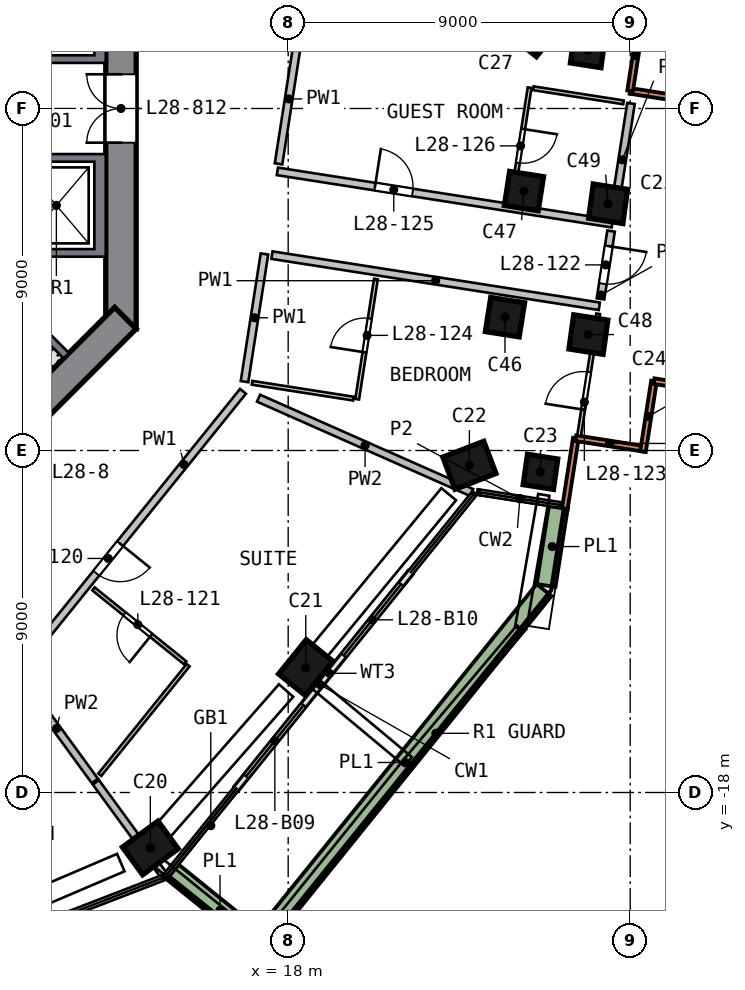
"""IFC4 building model, lengths in metres.
Left out: names, types, materials, properties, quantities, classifications, styles, units other than length and angle.
Written with IfcOpenShell. Run it as: python <this file> out.ifc"""

import sys

from ifc_helpers import new_model, si_unit, direction, frame, frame_2d, origin, origin_2d, place, context, subcontext, project, spatial, polyline, rectangle, outline, extrude, element, fill, save


model = new_model("IFC4")
c1 = context("Model", 3, precision=1e-05, world=origin(), true_north=direction((0.0, 1.0)))
c2 = subcontext(c1, "Body", "Model", "MODEL_VIEW")
j1 = project(units=[si_unit("LENGTHUNIT", "METRE"), si_unit("PLANEANGLEUNIT", "RADIAN")], contexts=[c1])
p1 = place(None, origin())
s1 = spatial("IfcSite", under=j1, at=p1, CompositionType="ELEMENT")
p2 = place(p1, origin())
s2 = spatial("IfcBuilding", under=s1, at=p2, CompositionType="ELEMENT")
p3 = place(p2, frame((0.0, 0.0, 118.5)))
s3 = spatial("IfcBuildingStorey", under=s2, at=p3, CompositionType="ELEMENT", Elevation=118.5)
p4 = place(p3, frame((14.261, -19.542, 0.0), z_axis=(0.092399372, 0.068632604, 0.993353875), x_axis=(-0.80243765, -0.585531111, 0.115096203)))
e1 = element("IfcColumn", 1, at=p4, inside=s3, PredefinedType="COLUMN", context=c2, shape_type="SweptSolid", body=[
    extrude(rectangle(XDim=1.15, YDim=0.9, at=origin_2d()), origin(), (0.0, 0.0, 1.0), 3.02),
])
p5 = place(p3, frame((18.378, -14.819, 0.0), z_axis=(0.069786874, 0.087981597, 0.99367451), x_axis=(0.624093395, 0.773238231, -0.11229458)))
e2 = element("IfcColumn", 2, at=p5, inside=s3, PredefinedType="COLUMN", context=c2, shape_type="SweptSolid", body=[
    extrude(rectangle(XDim=1.15, YDim=0.9, at=origin_2d()), origin(), (0.0, 0.0, 1.0), 3.019),
])
p6 = place(p3, frame((22.715, -9.521, 0.0), z_axis=(0.044289639, 0.108380303, 0.993122418), x_axis=(-0.93207803, -0.353286088, 0.080121696)))
e3 = element("IfcColumn", 3, at=p6, inside=s3, PredefinedType="COLUMN", context=c2, shape_type="SweptSolid", body=[
    extrude(rectangle(XDim=1.15, YDim=0.9, at=origin_2d()), origin(), (0.0, 0.0, 1.0), 3.021),
])
p7 = place(p3, frame((24.762, -9.729, 0.0), z_axis=(-0.10111444, 0.137518846, 0.985324534), x_axis=(0.982955724, -0.139038155, 0.120276498)))
e4 = element("IfcColumn", 4, at=p7, inside=s3, PredefinedType="COLUMN", context=c2, shape_type="SweptSolid", body=[
    extrude(rectangle(XDim=0.8, YDim=0.8, at=origin_2d()), origin(), (0.0, 0.0, 1.0), 3.045),
])
p8 = place(p3, frame((26.07, 1.362, 0.0), z_axis=(-0.15242064, 0.14215314, 0.978039075), x_axis=(-0.976379461, 0.131678342, -0.171300796)))
e5 = element("IfcColumn", 5, at=p8, inside=s3, PredefinedType="COLUMN", context=c2, shape_type="SweptSolid", body=[
    extrude(rectangle(XDim=0.8, YDim=0.8, at=origin_2d()), origin(), (0.0, 0.0, 1.0), 3.067),
])
p9 = place(p3, frame((24.377, 1.94, 0.0), z_axis=(-0.01026508, 0.115906491, 0.993207085), x_axis=(0.780504995, -0.619955936, 0.080415116)))
e6 = element("IfcColumn", 6, at=p9, inside=s3, PredefinedType="COLUMN", context=c2, shape_type="SweptSolid", body=[
    extrude(rectangle(XDim=1.15, YDim=0.9, at=origin_2d()), origin(), (0.0, 0.0, 1.0), 3.021),
])
for number, where, z_axis, x_axis in (
    (7, (23.673, -5.628, 0.0), (0.026, 0.113, 0.993), (0.988, -0.155, -0.008)),
    (8, (24.191, -2.312, 0.0), (0.01, 0.115, 0.993), (0.988, -0.153, 0.008)),
):
    element("IfcColumn", number, at=place(p3, frame(where, z_axis=z_axis, x_axis=x_axis)), inside=s3, PredefinedType="COLUMN", context=c2, shape_type="SweptSolid", body=[
        extrude(rectangle(XDim=0.9, YDim=0.9, at=origin_2d()), origin(), (0.0, 0.0, 1.0), 3.02),
    ])
p10 = place(p3, frame((26.044, -6.124, 0.0), z_axis=(-0.117876794, 0.14298759, 0.982679811), x_axis=(0.981143386, -0.135873277, 0.137463116)))
e9 = element("IfcColumn", 9, at=p10, inside=s3, PredefinedType="COLUMN", context=c2, shape_type="SweptSolid", body=[
    extrude(rectangle(XDim=0.9, YDim=0.9, at=origin_2d()), origin(), (0.0, 0.0, 1.0), 3.053),
])
p11 = place(p3, frame((26.581, -2.685, 0.0), z_axis=(-0.133791288, 0.145040287, 0.980338312), x_axis=(0.979119115, -0.13343364, 0.153366301)))
e10 = element("IfcColumn", 10, at=p11, inside=s3, PredefinedType="COLUMN", context=c2, shape_type="SweptSolid", body=[
    extrude(rectangle(XDim=0.9, YDim=0.9, at=origin_2d()), origin(), (0.0, 0.0, 1.0), 3.06),
])
p12 = place(p3, frame((13.6, -5.799, 0.0), z_axis=(0.0, 0.0, 1.0), x_axis=(0.0, 1.0, 0.0)))
e11 = element("IfcWall", 11, at=p12, inside=s3, PredefinedType="SHEAR", context=c2, shape_type="SweptSolid", body=[
    extrude(rectangle(XDim=11.598, YDim=0.8, at=frame_2d((5.799, 0.0))), origin(), (0.0, 0.0, 1.0), 3.5),
])
p13 = place(p12, frame((4.899, 0.0, 0.0)))
e12 = element("IfcOpeningElement", 12, at=p13, cuts=e11, PredefinedType="OPENING", context=c2, shape_type="SweptSolid", body=[
    extrude(rectangle(XDim=1.8, YDim=2.1, at=frame_2d((0.9, 1.05))), frame((0.0, 0.41, 0.0), z_axis=(0.0, -1.0, 0.0), x_axis=(1.0, 0.0, 0.0)), (0.0, 0.0, 1.0), 0.82),
])
p14 = place(p3, frame((5.516, -13.717, 0.0), z_axis=(0.0, 0.0, 1.0), x_axis=(0.707106781, 0.707106781, 0.0)))
e13 = element("IfcWall", 13, at=p14, inside=s3, PredefinedType="SHEAR", context=c2, shape_type="SweptSolid", body=[
    extrude(rectangle(XDim=11.598, YDim=0.8, at=frame_2d((5.799, 0.0))), origin(), (0.0, 0.0, 1.0), 3.5),
])
p15 = place(p14, frame((2.099, 0.0, 0.0)))
e14 = element("IfcOpeningElement", 14, at=p15, cuts=e13, PredefinedType="OPENING", context=c2, shape_type="SweptSolid", body=[
    extrude(rectangle(XDim=1.2, YDim=2.1, at=frame_2d((0.6, 1.05))), frame((0.0, 0.41, 0.0), z_axis=(0.0, -1.0, 0.0), x_axis=(1.0, 0.0, 0.0)), (0.0, 0.0, 1.0), 0.82),
])
p16 = place(p3, frame((25.28, -10.529, 0.0), z_axis=(0.0, 0.0, 1.0), x_axis=(0.154424544, 0.988004585, 0.0)))
e15 = element("IfcWall", 15, at=p16, inside=s3, PredefinedType="SOLIDWALL", context=c2, shape_type="SweptSolid", body=[
    extrude(rectangle(XDim=1.875, YDim=0.15, at=frame_2d((0.938, 0.0))), origin(), (0.0, 0.0, 1.0), 3.0),
])
p17 = place(p3, frame((25.569, -8.676, 0.0), z_axis=(0.0, 0.0, 1.0), x_axis=(0.98801462, -0.154360329, 0.0)))
e16 = element("IfcWall", 16, at=p17, inside=s3, PredefinedType="SOLIDWALL", context=c2, shape_type="SweptSolid", body=[
    extrude(rectangle(XDim=1.8, YDim=0.15, at=frame_2d((0.9, 0.0))), origin(), (0.0, 0.0, 1.0), 3.0),
])
for number, where, z_axis, x_axis in (
    (17, (27.336, -9.028, 0.0), (0.0, 0.0, 1.0), (0.154, 0.988, 0.0)),
    (18, (27.625, -7.175, 0.0), (0.0, 0.0, 1.0), (0.988, -0.154, 0.0)),
):
    element("IfcWall", number, at=place(p3, frame(where, z_axis=z_axis, x_axis=x_axis)), inside=s3, PredefinedType="SOLIDWALL", context=c2, shape_type="SweptSolid", body=[
        extrude(rectangle(XDim=1.875, YDim=0.15, at=frame_2d((0.938, 0.0))), origin(), (0.0, 0.0, 1.0), 3.0),
    ])
p18 = place(p3, frame((28.849, 0.174, 0.0), z_axis=(0.0, 0.0, 1.0), x_axis=(-0.988021343, 0.154317292, 0.0)))
e19 = element("IfcWall", 19, at=p18, inside=s3, PredefinedType="SOLIDWALL", context=c2, shape_type="SweptSolid", body=[
    extrude(rectangle(XDim=1.875, YDim=0.15, at=frame_2d((0.938, 0.0))), origin(), (0.0, 0.0, 1.0), 3.0),
])
p19 = place(p3, frame((26.997, 0.463, 0.0), z_axis=(0.0, 0.0, 1.0), x_axis=(0.154297439, 0.988024443, 0.0)))
e20 = element("IfcWall", 20, at=p19, inside=s3, PredefinedType="SOLIDWALL", context=c2, shape_type="SweptSolid", body=[
    extrude(rectangle(XDim=1.875, YDim=0.15, at=frame_2d((0.938, 0.0))), origin(), (0.0, 0.0, 1.0), 3.0),
])
p20 = place(p3, frame((16.645, -17.885, 0.0), z_axis=(0.0, 0.0, 1.0), x_axis=(0.627731853, 0.778429651, 0.0)))
e21 = element("IfcWall", 21, at=p20, inside=s3, PredefinedType="SOLIDWALL", context=c2, shape_type="SweptSolid", body=[
    extrude(rectangle(XDim=3.475, YDim=0.15, at=frame_2d((1.738, 0.0))), origin(), (0.0, 0.0, 1.0), 2.935),
])
p21 = place(p20, frame((0.4, 0.0, 0.0)))
e22 = element("IfcOpeningElement", 22, at=p21, cuts=e21, PredefinedType="OPENING", context=c2, shape_type="SweptSolid", body=[
    extrude(rectangle(XDim=2.4, YDim=2.4, at=frame_2d((1.2, 1.2))), frame((0.0, 0.085, 0.0), z_axis=(0.0, -1.0, 0.0), x_axis=(1.0, 0.0, 0.0)), (0.0, 0.0, 1.0), 0.17),
])
p22 = place(p3, frame((18.826, -15.18, 0.0), z_axis=(0.0, 0.0, 1.0), x_axis=(0.627703654, 0.77845239, 0.0)))
e23 = element("IfcWall", 23, at=p22, inside=s3, PredefinedType="SOLIDWALL", context=c2, shape_type="SweptSolid", body=[
    extrude(rectangle(XDim=3.814, YDim=0.15, at=frame_2d((1.907, 0.0))), origin(), (0.0, 0.0, 1.0), 2.935),
])
p23 = place(p22, frame((1.014, 0.0, 0.0)))
e24 = element("IfcOpeningElement", 24, at=p23, cuts=e23, PredefinedType="OPENING", context=c2, shape_type="SweptSolid", body=[
    extrude(rectangle(XDim=2.4, YDim=2.4, at=frame_2d((1.2, 1.2))), frame((0.0, 0.085, 0.0), z_axis=(0.0, -1.0, 0.0), x_axis=(1.0, 0.0, 0.0)), (0.0, 0.0, 1.0), 0.17),
])
p24 = place(p3, frame((14.962, -20.093, 0.0), z_axis=(0.0, 0.0, 1.0), x_axis=(0.778443113, -0.627715158, 0.0)))
e25 = element("IfcWall", 25, at=p24, inside=s3, PredefinedType="SOLIDWALL", context=c2, shape_type="SweptSolid", body=[
    extrude(rectangle(XDim=3.199, YDim=0.5, at=frame_2d((1.6, 0.0))), origin(), (0.0, 0.0, 1.0), 0.7),
])
p25 = place(p3, frame((17.415, -21.749, 0.0), z_axis=(0.0, 0.0, 1.0), x_axis=(0.627680422, 0.778471122, 0.0)))
e26 = element("IfcWall", 26, at=p25, inside=s3, PredefinedType="SOLIDWALL", context=c2, shape_type="SweptSolid", body=[
    extrude(rectangle(XDim=11.661, YDim=0.5, at=frame_2d((5.83, 0.0))), origin(), (0.0, 0.0, 1.0), 0.7),
])
p26 = place(p3, frame((24.786, -12.553, 0.0), z_axis=(0.0, 0.0, 1.0), x_axis=(0.154416344, 0.988005867, 0.0)))
e27 = element("IfcWall", 27, at=p26, inside=s3, PredefinedType="SOLIDWALL", context=c2, shape_type="SweptSolid", body=[
    extrude(rectangle(XDim=2.076, YDim=0.5, at=frame_2d((1.038, 0.0))), origin(), (0.0, 0.0, 1.0), 0.7),
])
p27 = place(p3, origin())
e28 = element("IfcWall", 28, at=p27, inside=s3, PredefinedType="SOLIDWALL", context=c2, shape_type="SweptSolid", body=[
    extrude(outline(polyline([(13.2, -3.9), (10.9, -3.9), (10.9, -3.7), (12.9, -3.7), (12.9, -1.4), (10.9, -1.4), (10.9, -1.2), (13.2, -1.2), (13.2, -3.9)])), origin(), (0.0, 0.0, 1.0), 3.0),
])
p28 = place(p3, origin())
e29 = element("IfcWall", 29, at=p28, inside=s3, PredefinedType="SOLIDWALL", context=c2, shape_type="SweptSolid", body=[
    extrude(outline(polyline([(13.2, 3.9), (13.2, 1.2), (10.9, 1.2), (10.9, 1.4), (12.9, 1.4), (12.9, 3.7), (10.9, 3.7), (10.9, 3.9), (13.2, 3.9)])), origin(), (0.0, 0.0, 1.0), 3.0),
])
p29 = place(p3, frame((9.334, -3.677, 0.0), z_axis=(0.0, 0.0, 1.0), x_axis=(0.707106781, -0.707106781, 0.0)))
e30 = element("IfcWall", 30, at=p29, inside=s3, PredefinedType="SOLIDWALL", context=c2, shape_type="SweptSolid", body=[
    extrude(rectangle(XDim=4.0, YDim=0.2, at=frame_2d((2.0, 0.0))), origin(), (0.0, 0.0, 1.0), 3.0),
])
p30 = place(p3, frame((16.811, -7.443, 0.0), z_axis=(0.0, 0.0, 1.0), x_axis=(-0.627684838, -0.778467561, 0.0)))
e31 = element("IfcWall", 31, at=p30, inside=s3, PredefinedType="SOLIDWALL", context=c2, shape_type="SweptSolid", body=[
    extrude(rectangle(XDim=9.317, YDim=0.2, at=frame_2d((4.658, 0.0))), origin(), (0.0, 0.0, 1.0), 3.0),
])
p31 = place(p30, frame((5.15, 0.0, 0.0)))
e32 = element("IfcOpeningElement", 32, at=p31, cuts=e31, PredefinedType="OPENING", context=c2, shape_type="SweptSolid", body=[
    extrude(rectangle(XDim=1.0, YDim=2.1, at=frame_2d((0.5, 1.05))), frame((0.0, 0.11, 0.0), z_axis=(0.0, -1.0, 0.0), x_axis=(1.0, 0.0, 0.0)), (0.0, 0.0, 1.0), 0.22),
])
p32 = place(p3, frame((16.851, -7.187, 0.0), z_axis=(0.0, 0.0, 1.0), x_axis=(0.154387833, 0.988010322, 0.0)))
e33 = element("IfcWall", 33, at=p32, inside=s3, PredefinedType="SOLIDWALL", context=c2, shape_type="SweptSolid", body=[
    extrude(rectangle(XDim=3.4, YDim=0.2, at=frame_2d((1.7, 0.0))), origin(), (0.0, 0.0, 1.0), 3.0),
])
p33 = place(p3, frame((17.746, -1.457, 0.0), z_axis=(0.0, 0.0, 1.0), x_axis=(0.154396263, 0.988009005, 0.0)))
e34 = element("IfcWall", 34, at=p33, inside=s3, PredefinedType="SOLIDWALL", context=c2, shape_type="SweptSolid", body=[
    extrude(rectangle(XDim=3.458, YDim=0.2, at=frame_2d((1.729, 0.0))), origin(), (0.0, 0.0, 1.0), 3.0),
])
p34 = place(p3, frame((17.573, -3.859, 0.0), z_axis=(0.0, 0.0, 1.0), x_axis=(0.9880119, -0.154377734, 0.0)))
e35 = element("IfcWall", 35, at=p34, inside=s3, PredefinedType="SOLIDWALL", context=c2, shape_type="SweptSolid", body=[
    extrude(rectangle(XDim=8.719, YDim=0.2, at=frame_2d((4.359, 0.0))), origin(), (0.0, 0.0, 1.0), 3.0),
])
p35 = place(p3, frame((17.715, -1.655, 0.0), z_axis=(0.0, 0.0, 1.0), x_axis=(0.988013599, -0.154366859, 0.0)))
e36 = element("IfcWall", 36, at=p35, inside=s3, PredefinedType="SOLIDWALL", context=c2, shape_type="SweptSolid", body=[
    extrude(rectangle(XDim=8.918, YDim=0.2, at=frame_2d((4.459, 0.0))), origin(), (0.0, 0.0, 1.0), 3.0),
])
p36 = place(p35, frame((2.6, 0.0, 0.0)))
e37 = element("IfcOpeningElement", 37, at=p36, cuts=e36, PredefinedType="OPENING", context=c2, shape_type="SweptSolid", body=[
    extrude(rectangle(XDim=1.0, YDim=2.1, at=frame_2d((0.5, 1.05))), frame((0.0, 0.11, 0.0), z_axis=(0.0, -1.0, 0.0), x_axis=(1.0, 0.0, 0.0)), (0.0, 0.0, 1.0), 0.22),
])
p37 = place(p3, frame((26.496, -3.227, 0.0), z_axis=(0.0, 0.0, 1.0), x_axis=(-0.154273674, -0.988028154, 0.0)))
e38 = element("IfcWall", 38, at=p37, inside=s3, PredefinedType="SOLIDWALL", context=c2, shape_type="SweptSolid", body=[
    extrude(rectangle(XDim=1.804, YDim=0.2, at=frame_2d((0.902, 0.0))), origin(), (0.0, 0.0, 1.0), 3.0),
])
p38 = place(p37, frame((0.4, 0.0, 0.0)))
e39 = element("IfcOpeningElement", 39, at=p38, cuts=e38, PredefinedType="OPENING", context=c2, shape_type="SweptSolid", body=[
    extrude(rectangle(XDim=1.0, YDim=2.1, at=frame_2d((0.5, 1.05))), frame((0.0, 0.11, 0.0), z_axis=(0.0, -1.0, 0.0), x_axis=(1.0, 0.0, 0.0)), (0.0, 0.0, 1.0), 0.22),
])
p39 = place(p3, frame((10.898, -14.935, 0.0), z_axis=(0.0, 0.0, 1.0), x_axis=(0.589504337, -0.807765211, 0.0)))
e40 = element("IfcWall", 40, at=p39, inside=s3, PredefinedType="SOLIDWALL", context=c2, shape_type="SweptSolid", body=[
    extrude(rectangle(XDim=3.418, YDim=0.2, at=frame_2d((1.709, 0.0))), origin(), (0.0, 0.0, 1.0), 3.0),
])
p40 = place(p3, frame((12.941, -17.733, 0.0), z_axis=(0.0, 0.0, 1.0), x_axis=(0.58946764, -0.807791991, 0.0)))
e41 = element("IfcWall", 41, at=p40, inside=s3, PredefinedType="SOLIDWALL", context=c2, shape_type="SweptSolid", body=[
    extrude(rectangle(XDim=3.011, YDim=0.2, at=frame_2d((1.506, 0.0))), origin(), (0.0, 0.0, 1.0), 3.0),
])
p41 = place(p3, frame((17.22, -7.624, 0.0), z_axis=(0.0, 0.0, 1.0), x_axis=(0.914388555, -0.404837709, 0.0)))
e42 = element("IfcWall", 42, at=p41, inside=s3, PredefinedType="SOLIDWALL", context=c2, shape_type="SweptSolid", body=[
    extrude(rectangle(XDim=6.132, YDim=0.2, at=frame_2d((3.066, 0.0))), origin(), (0.0, 0.0, 1.0), 3.0),
])
p42 = place(p3, frame((26.558, -2.835, 0.0), z_axis=(0.0, 0.0, 1.0), x_axis=(0.154347127, 0.988016682, 0.0)))
e43 = element("IfcWall", 43, at=p42, inside=s3, PredefinedType="SOLIDWALL", context=c2, shape_type="SweptSolid", body=[
    extrude(rectangle(XDim=3.004, YDim=0.2, at=frame_2d((1.502, 0.0))), origin(), (0.0, 0.0, 1.0), 3.0),
])
p43 = place(p3, frame((15.289, -14.587, 0.0), z_axis=(0.0, 0.0, 1.0), x_axis=(-0.778450282, 0.627706268, 0.0)))
e44 = element("IfcWall", 44, at=p43, inside=s3, PredefinedType="PARTITIONING", context=c2, shape_type="SweptSolid", body=[
    extrude(rectangle(XDim=3.1, YDim=0.1, at=frame_2d((1.55, 0.0))), origin(), (0.0, 0.0, 1.0), 3.0),
])
p44 = place(p43, frame((1.15, 0.0, 0.0)))
e45 = element("IfcOpeningElement", 45, at=p44, cuts=e44, PredefinedType="OPENING", context=c2, shape_type="SweptSolid", body=[
    extrude(rectangle(XDim=0.9, YDim=2.1, at=frame_2d((0.45, 1.05))), frame((0.0, 0.06, 0.0), z_axis=(0.0, -1.0, 0.0), x_axis=(1.0, 0.0, 0.0)), (0.0, 0.0, 1.0), 0.12),
])
p45 = place(p3, frame((15.367, -14.65, 0.0), z_axis=(0.0, 0.0, 1.0), x_axis=(-0.627672573, -0.778477451, 0.0)))
e46 = element("IfcWall", 46, at=p45, inside=s3, PredefinedType="PARTITIONING", context=c2, shape_type="SweptSolid", body=[
    extrude(rectangle(XDim=3.704, YDim=0.1, at=frame_2d((1.852, 0.0))), origin(), (0.0, 0.0, 1.0), 3.0),
])
p46 = place(p3, frame((17.048, -7.218, 0.0), z_axis=(0.0, 0.0, 1.0), x_axis=(0.988016774, -0.154346539, 0.0)))
e47 = element("IfcWall", 47, at=p46, inside=s3, PredefinedType="PARTITIONING", context=c2, shape_type="SweptSolid", body=[
    extrude(rectangle(XDim=2.7, YDim=0.1, at=frame_2d((1.35, 0.0))), origin(), (0.0, 0.0, 1.0), 3.0),
])
p47 = place(p3, frame((19.815, -7.65, 0.0), z_axis=(0.0, 0.0, 1.0), x_axis=(0.154344297, 0.988017124, 0.0)))
e48 = element("IfcWall", 48, at=p47, inside=s3, PredefinedType="PARTITIONING", context=c2, shape_type="SweptSolid", body=[
    extrude(rectangle(XDim=3.2, YDim=0.1, at=frame_2d((1.6, 0.0))), origin(), (0.0, 0.0, 1.0), 3.0),
])
p48 = place(p47, frame((1.25, 0.0, 0.0)))
e49 = element("IfcOpeningElement", 49, at=p48, cuts=e48, PredefinedType="OPENING", context=c2, shape_type="SweptSolid", body=[
    extrude(rectangle(XDim=0.9, YDim=2.1, at=frame_2d((0.45, 1.05))), frame((0.0, 0.06, 0.0), z_axis=(0.0, -1.0, 0.0), x_axis=(1.0, 0.0, 0.0)), (0.0, 0.0, 1.0), 0.12),
])
p49 = place(p3, frame((24.353, 0.547, 0.0), z_axis=(0.0, 0.0, 1.0), x_axis=(-0.154374398, -0.988012422, 0.0)))
e50 = element("IfcWall", 50, at=p49, inside=s3, PredefinedType="PARTITIONING", context=c2, shape_type="SweptSolid", body=[
    extrude(rectangle(XDim=3.0, YDim=0.1, at=frame_2d((1.5, 0.0))), origin(), (0.0, 0.0, 1.0), 3.0),
])
p50 = place(p49, frame((1.1, 0.0, 0.0)))
e51 = element("IfcOpeningElement", 51, at=p50, cuts=e50, PredefinedType="OPENING", context=c2, shape_type="SweptSolid", body=[
    extrude(rectangle(XDim=0.9, YDim=2.1, at=frame_2d((0.45, 1.05))), frame((0.0, 0.06, 0.0), z_axis=(0.0, -1.0, 0.0), x_axis=(1.0, 0.0, 0.0)), (0.0, 0.0, 1.0), 0.12),
])
p51 = place(p3, frame((24.452, 0.532, 0.0), z_axis=(0.0, 0.0, 1.0), x_axis=(0.988019791, -0.154327226, 0.0)))
e52 = element("IfcWall", 52, at=p51, inside=s3, PredefinedType="PARTITIONING", context=c2, shape_type="SweptSolid", body=[
    extrude(rectangle(XDim=2.4, YDim=0.1, at=frame_2d((1.2, 0.0))), origin(), (0.0, 0.0, 1.0), 3.0),
])
p52 = place(p3, frame((25.654, -8.615, 0.0), z_axis=(0.0, 0.0, 1.0), x_axis=(0.154420391, 0.988005234, 0.0)))
e53 = element("IfcWall", 53, at=p52, inside=s3, PredefinedType="PARTITIONING", context=c2, shape_type="SweptSolid", body=[
    extrude(rectangle(XDim=3.252, YDim=0.1, at=frame_2d((1.626, 0.0))), origin(), (0.0, 0.0, 1.0), 3.0),
])
p53 = place(p52, frame((0.7, 0.0, 0.0)))
e54 = element("IfcOpeningElement", 54, at=p53, cuts=e53, PredefinedType="OPENING", context=c2, shape_type="SweptSolid", body=[
    extrude(rectangle(XDim=1.0, YDim=2.1, at=frame_2d((0.5, 1.05))), frame((0.0, 0.06, 0.0), z_axis=(0.0, -1.0, 0.0), x_axis=(1.0, 0.0, 0.0)), (0.0, 0.0, 1.0), 0.12),
])
p54 = place(p21, origin())
e55 = element("IfcDoor", 55, at=p54, inside=s3, OperationType="SLIDING_TO_RIGHT", PredefinedType="DOOR", context=c2, shape_type="SweptSolid", body=[
    extrude(rectangle(XDim=2.4, YDim=2.4, at=frame_2d((1.2, 1.2))), frame((0.0, 0.025, 0.0), z_axis=(0.0, -1.0, 0.0), x_axis=(1.0, 0.0, 0.0)), (0.0, 0.0, 1.0), 0.05),
])
fill(e22, e55)
p55 = place(p23, origin())
e56 = element("IfcDoor", 56, at=p55, inside=s3, OperationType="SLIDING_TO_LEFT", PredefinedType="DOOR", context=c2, shape_type="SweptSolid", body=[
    extrude(rectangle(XDim=2.4, YDim=2.4, at=frame_2d((1.2, 1.2))), frame((0.0, 0.025, 0.0), z_axis=(0.0, -1.0, 0.0), x_axis=(1.0, 0.0, 0.0)), (0.0, 0.0, 1.0), 0.05),
])
fill(e24, e56)
p56 = place(p13, origin())
e57 = element("IfcDoor", 57, at=p56, inside=s3, OperationType="DOUBLE_DOOR_SINGLE_SWING", PredefinedType="DOOR", context=c2, shape_type="SweptSolid", body=[
    extrude(rectangle(XDim=1.8, YDim=2.1, at=frame_2d((0.9, 1.05))), frame((0.0, 0.025, 0.0), z_axis=(0.0, -1.0, 0.0), x_axis=(1.0, 0.0, 0.0)), (0.0, 0.0, 1.0), 0.05),
])
fill(e12, e57)
p57 = place(p31, origin())
e58 = element("IfcDoor", 58, at=p57, inside=s3, OperationType="SINGLE_SWING_LEFT", PredefinedType="DOOR", context=c2, shape_type="SweptSolid", body=[
    extrude(rectangle(XDim=1.0, YDim=2.1, at=frame_2d((0.5, 1.05))), frame((0.0, 0.025, 0.0), z_axis=(0.0, -1.0, 0.0), x_axis=(1.0, 0.0, 0.0)), (0.0, 0.0, 1.0), 0.05),
])
fill(e32, e58)
p58 = place(p44, origin())
e59 = element("IfcDoor", 59, at=p58, inside=s3, OperationType="SINGLE_SWING_LEFT", PredefinedType="DOOR", context=c2, shape_type="SweptSolid", body=[
    extrude(rectangle(XDim=0.9, YDim=2.1, at=frame_2d((0.45, 1.05))), frame((0.0, 0.025, 0.0), z_axis=(0.0, -1.0, 0.0), x_axis=(1.0, 0.0, 0.0)), (0.0, 0.0, 1.0), 0.05),
])
fill(e45, e59)
p59 = place(p38, origin())
e60 = element("IfcDoor", 60, at=p59, inside=s3, OperationType="SINGLE_SWING_LEFT", PredefinedType="DOOR", context=c2, shape_type="SweptSolid", body=[
    extrude(rectangle(XDim=1.0, YDim=2.1, at=frame_2d((0.5, 1.05))), frame((0.0, 0.025, 0.0), z_axis=(0.0, -1.0, 0.0), x_axis=(1.0, 0.0, 0.0)), (0.0, 0.0, 1.0), 0.05),
])
fill(e39, e60)
p60 = place(p53, origin())
e61 = element("IfcDoor", 61, at=p60, inside=s3, OperationType="SINGLE_SWING_LEFT", PredefinedType="DOOR", context=c2, shape_type="SweptSolid", body=[
    extrude(rectangle(XDim=1.0, YDim=2.1, at=frame_2d((0.5, 1.05))), frame((0.0, 0.025, 0.0), z_axis=(0.0, -1.0, 0.0), x_axis=(1.0, 0.0, 0.0)), (0.0, 0.0, 1.0), 0.05),
])
fill(e54, e61)
p61 = place(p48, origin())
e62 = element("IfcDoor", 62, at=p61, inside=s3, OperationType="SINGLE_SWING_LEFT", PredefinedType="DOOR", context=c2, shape_type="SweptSolid", body=[
    extrude(rectangle(XDim=0.9, YDim=2.1, at=frame_2d((0.45, 1.05))), frame((0.0, 0.025, 0.0), z_axis=(0.0, -1.0, 0.0), x_axis=(1.0, 0.0, 0.0)), (0.0, 0.0, 1.0), 0.05),
])
fill(e49, e62)
p62 = place(p36, origin())
e63 = element("IfcDoor", 63, at=p62, inside=s3, OperationType="SINGLE_SWING_LEFT", PredefinedType="DOOR", context=c2, shape_type="SweptSolid", body=[
    extrude(rectangle(XDim=1.0, YDim=2.1, at=frame_2d((0.5, 1.05))), frame((0.0, 0.025, 0.0), z_axis=(0.0, -1.0, 0.0), x_axis=(1.0, 0.0, 0.0)), (0.0, 0.0, 1.0), 0.05),
])
fill(e37, e63)
p63 = place(p50, origin())
e64 = element("IfcDoor", 64, at=p63, inside=s3, OperationType="SINGLE_SWING_LEFT", PredefinedType="DOOR", context=c2, shape_type="SweptSolid", body=[
    extrude(rectangle(XDim=0.9, YDim=2.1, at=frame_2d((0.45, 1.05))), frame((0.0, 0.025, 0.0), z_axis=(0.0, -1.0, 0.0), x_axis=(1.0, 0.0, 0.0)), (0.0, 0.0, 1.0), 0.05),
])
fill(e51, e64)
save(model, sys.argv[1])
